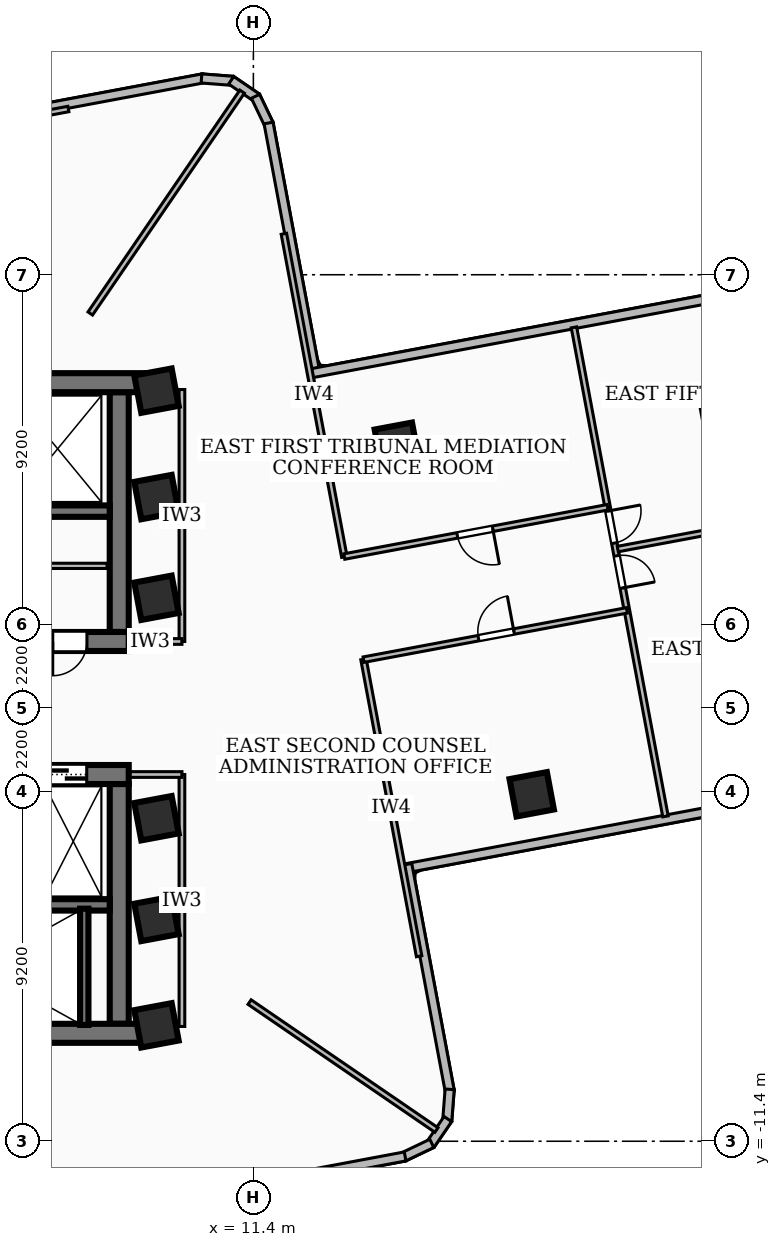
"""IFC4 building model, lengths in metres.
Left out: names, types, materials, properties, quantities, classifications, styles, units other than length and angle.
Written with IfcOpenShell. Run it as: python <this file> out.ifc"""

import sys

from ifc_helpers import new_model, si_unit, direction, frame, frame_2d, origin, origin_2d, place, context, subcontext, project, spatial, rectangle, extrude, element, fill, save


model = new_model("IFC4")
c1 = context("Model", 3, precision=1e-05, world=origin(), true_north=direction((0.0, 1.0)))
c2 = subcontext(c1, "Body", "Model", "MODEL_VIEW")
j1 = project(units=[si_unit("LENGTHUNIT", "METRE"), si_unit("PLANEANGLEUNIT", "RADIAN")], contexts=[c1])
p1 = place(None, origin())
s1 = spatial("IfcSite", under=j1, at=p1, CompositionType="ELEMENT")
p2 = place(p1, origin())
s2 = spatial("IfcBuilding", under=s1, at=p2, CompositionType="ELEMENT")
p3 = place(p2, frame((0.0, 0.0, 100.08)))
s3 = spatial("IfcBuildingStorey", under=s2, at=p3, CompositionType="ELEMENT", Elevation=100.08)
p4 = place(p3, frame((-8.78, 8.56, 0.0), z_axis=(0.0, 0.0, 1.0), x_axis=(1.0, 0.0, 0.0)))
e1 = element("IfcWall", 1, at=p4, inside=s3, PredefinedType="SHEAR", context=c2, shape_type="SweptSolid", body=[
    extrude(rectangle(XDim=17.56, YDim=0.5, at=frame_2d((8.78, 0.0))), origin(), (0.0, 0.0, 1.0), 3.34),
])
p5 = place(p3, frame((8.12, 1.75, 0.0), z_axis=(0.0, 0.0, 1.0), x_axis=(-1.0, 0.0, 0.0)))
e2 = element("IfcWall", 2, at=p5, inside=s3, PredefinedType="SHEAR", context=c2, shape_type="SweptSolid", body=[
    extrude(rectangle(XDim=16.24, YDim=0.5, at=frame_2d((8.12, 0.0))), origin(), (0.0, 0.0, 1.0), 3.34),
])
p6 = place(p5, frame((7.45, 0.0, 0.0)))
e3 = element("IfcOpeningElement", 3, at=p6, cuts=e2, PredefinedType="OPENING", context=c2, shape_type="SweptSolid", body=[
    extrude(rectangle(XDim=1.0, YDim=2.1, at=frame_2d((0.5, 1.05))), frame((0.0, 0.26, 0.0), z_axis=(0.0, -1.0, 0.0), x_axis=(1.0, 0.0, 0.0)), (0.0, 0.0, 1.0), 0.52),
])
p7 = place(p5, frame((3.4, 0.0, 0.0)))
e4 = element("IfcOpeningElement", 4, at=p7, cuts=e2, PredefinedType="OPENING", context=c2, shape_type="SweptSolid", body=[
    extrude(rectangle(XDim=0.9, YDim=2.06, at=frame_2d((0.45, 1.03))), frame((0.0, 0.26, 0.0), z_axis=(0.0, -1.0, 0.0), x_axis=(1.0, 0.0, 0.0)), (0.0, 0.0, 1.0), 0.52),
])
p8 = place(p5, frame((1.1, 0.0, 0.0)))
e5 = element("IfcOpeningElement", 5, at=p8, cuts=e2, PredefinedType="OPENING", context=c2, shape_type="SweptSolid", body=[
    extrude(rectangle(XDim=0.9, YDim=2.06, at=frame_2d((0.45, 1.03))), frame((0.0, 0.26, 0.0), z_axis=(0.0, -1.0, 0.0), x_axis=(1.0, 0.0, 0.0)), (0.0, 0.0, 1.0), 0.52),
])
p9 = place(p3, frame((7.87, 8.31, 0.0), z_axis=(0.0, 0.0, 1.0), x_axis=(0.0, -1.0, 0.0)))
e6 = element("IfcWall", 6, at=p9, inside=s3, PredefinedType="SHEAR", context=c2, shape_type="SweptSolid", body=[
    extrude(rectangle(XDim=6.31, YDim=0.5, at=frame_2d((3.155, 0.0))), origin(), (0.0, 0.0, 1.0), 3.34),
])
p10 = place(p3, frame((7.62, 5.18, 0.0), z_axis=(0.0, 0.0, 1.0), x_axis=(-1.0, 0.0, 0.0)))
e7 = element("IfcWall", 7, at=p10, inside=s3, PredefinedType="SOLIDWALL", context=c2, shape_type="SweptSolid", body=[
    extrude(rectangle(XDim=15.24, YDim=0.3, at=frame_2d((7.62, 0.0))), origin(), (0.0, 0.0, 1.0), 3.34),
])
p11 = place(p10, frame((5.77, 0.0, 0.0)))
e8 = element("IfcOpeningElement", 8, at=p11, cuts=e7, PredefinedType="OPENING", context=c2, shape_type="SweptSolid", body=[
    extrude(rectangle(XDim=1.1, YDim=2.15, at=frame_2d((0.55, 1.075))), frame((0.0, 0.16, 0.0), z_axis=(0.0, -1.0, 0.0), x_axis=(1.0, 0.0, 0.0)), (0.0, 0.0, 1.0), 0.32),
])
p12 = place(p10, frame((2.97, 0.0, 0.0)))
e9 = element("IfcOpeningElement", 9, at=p12, cuts=e7, PredefinedType="OPENING", context=c2, shape_type="SweptSolid", body=[
    extrude(rectangle(XDim=1.1, YDim=2.15, at=frame_2d((0.55, 1.075))), frame((0.0, 0.16, 0.0), z_axis=(0.0, -1.0, 0.0), x_axis=(1.0, 0.0, 0.0)), (0.0, 0.0, 1.0), 0.32),
])
p13 = place(p10, frame((7.97, 0.0, 0.0)))
e10 = element("IfcOpeningElement", 10, at=p13, cuts=e7, PredefinedType="OPENING", context=c2, shape_type="SweptSolid", body=[
    extrude(rectangle(XDim=1.0, YDim=2.1, at=frame_2d((0.5, 1.05))), frame((0.0, 0.16, 0.0), z_axis=(0.0, -1.0, 0.0), x_axis=(1.0, 0.0, 0.0)), (0.0, 0.0, 1.0), 0.32),
])
p14 = place(p3, frame((8.78, -8.56, 0.0), z_axis=(0.0, 0.0, 1.0), x_axis=(-1.0, 0.0, 0.0)))
e11 = element("IfcWall", 11, at=p14, inside=s3, PredefinedType="SHEAR", context=c2, shape_type="SweptSolid", body=[
    extrude(rectangle(XDim=17.56, YDim=0.5, at=frame_2d((8.78, 0.0))), origin(), (0.0, 0.0, 1.0), 3.34),
])
p15 = place(p3, frame((-8.12, -1.75, 0.0), z_axis=(0.0, 0.0, 1.0), x_axis=(1.0, 0.0, 0.0)))
e12 = element("IfcWall", 12, at=p15, inside=s3, PredefinedType="SHEAR", context=c2, shape_type="SweptSolid", body=[
    extrude(rectangle(XDim=16.24, YDim=0.5, at=frame_2d((8.12, 0.0))), origin(), (0.0, 0.0, 1.0), 3.34),
])
p16 = place(p15, frame((7.45, 0.0, 0.0)))
e13 = element("IfcOpeningElement", 13, at=p16, cuts=e12, PredefinedType="OPENING", context=c2, shape_type="SweptSolid", body=[
    extrude(rectangle(XDim=1.0, YDim=2.1, at=frame_2d((0.5, 1.05))), frame((0.0, 0.26, 0.0), z_axis=(0.0, -1.0, 0.0), x_axis=(1.0, 0.0, 0.0)), (0.0, 0.0, 1.0), 0.52),
])
p17 = place(p15, frame((10.965, 0.0, 0.0)))
e14 = element("IfcOpeningElement", 14, at=p17, cuts=e12, PredefinedType="OPENING", context=c2, shape_type="SweptSolid", body=[
    extrude(rectangle(XDim=1.05, YDim=2.15, at=frame_2d((0.525, 1.075))), frame((0.0, 0.26, 0.0), z_axis=(0.0, -1.0, 0.0), x_axis=(1.0, 0.0, 0.0)), (0.0, 0.0, 1.0), 0.52),
])
p18 = place(p15, frame((12.525, 0.0, 0.0)))
e15 = element("IfcOpeningElement", 15, at=p18, cuts=e12, PredefinedType="OPENING", context=c2, shape_type="SweptSolid", body=[
    extrude(rectangle(XDim=1.05, YDim=2.15, at=frame_2d((0.525, 1.075))), frame((0.0, 0.26, 0.0), z_axis=(0.0, -1.0, 0.0), x_axis=(1.0, 0.0, 0.0)), (0.0, 0.0, 1.0), 0.52),
])
p19 = place(p15, frame((14.085, 0.0, 0.0)))
e16 = element("IfcOpeningElement", 16, at=p19, cuts=e12, PredefinedType="OPENING", context=c2, shape_type="SweptSolid", body=[
    extrude(rectangle(XDim=1.05, YDim=2.15, at=frame_2d((0.525, 1.075))), frame((0.0, 0.26, 0.0), z_axis=(0.0, -1.0, 0.0), x_axis=(1.0, 0.0, 0.0)), (0.0, 0.0, 1.0), 0.52),
])
p20 = place(p3, frame((7.87, -2.0, 0.0), z_axis=(0.0, 0.0, 1.0), x_axis=(0.0, -1.0, 0.0)))
e17 = element("IfcWall", 17, at=p20, inside=s3, PredefinedType="SHEAR", context=c2, shape_type="SweptSolid", body=[
    extrude(rectangle(XDim=6.31, YDim=0.5, at=frame_2d((3.155, 0.0))), origin(), (0.0, 0.0, 1.0), 3.34),
])
p21 = place(p3, frame((-7.62, -5.18, 0.0), z_axis=(0.0, 0.0, 1.0), x_axis=(1.0, 0.0, 0.0)))
e18 = element("IfcWall", 18, at=p21, inside=s3, PredefinedType="SOLIDWALL", context=c2, shape_type="SweptSolid", body=[
    extrude(rectangle(XDim=15.24, YDim=0.3, at=frame_2d((7.62, 0.0))), origin(), (0.0, 0.0, 1.0), 3.34),
])
p22 = place(p21, frame((5.77, 0.0, 0.0)))
e19 = element("IfcOpeningElement", 19, at=p22, cuts=e18, PredefinedType="OPENING", context=c2, shape_type="SweptSolid", body=[
    extrude(rectangle(XDim=1.1, YDim=2.15, at=frame_2d((0.55, 1.075))), frame((0.0, 0.16, 0.0), z_axis=(0.0, -1.0, 0.0), x_axis=(1.0, 0.0, 0.0)), (0.0, 0.0, 1.0), 0.32),
])
p23 = place(p21, frame((7.97, 0.0, 0.0)))
e20 = element("IfcOpeningElement", 20, at=p23, cuts=e18, PredefinedType="OPENING", context=c2, shape_type="SweptSolid", body=[
    extrude(rectangle(XDim=1.0, YDim=2.1, at=frame_2d((0.5, 1.05))), frame((0.0, 0.16, 0.0), z_axis=(0.0, -1.0, 0.0), x_axis=(1.0, 0.0, 0.0)), (0.0, 0.0, 1.0), 0.32),
])
p24 = place(p3, frame((6.95, -8.34, 0.0), z_axis=(0.0, 0.0, 1.0), x_axis=(0.0, 1.0, 0.0)))
e21 = element("IfcWall", 21, at=p24, inside=s3, PredefinedType="SOLIDWALL", context=c2, shape_type="SweptSolid", body=[
    extrude(rectangle(XDim=3.06, YDim=0.22, at=frame_2d((1.53, 0.0))), origin(), (0.0, 0.0, 1.0), 3.34),
])
for number, where, z_axis, x_axis in (
    (22, (8.85, -5.55, 0.0), (0.0, 0.0, 1.0), (0.983, 0.184, 0.0)),
    (23, (8.85, -2.9, 0.0), (0.0, 0.0, 1.0), (0.983, 0.184, 0.0)),
    (24, (8.85, 2.9, 0.0), (0.0, 0.0, 1.0), (0.983, 0.184, 0.0)),
    (25, (8.85, 5.55, 0.0), (0.0, 0.0, 1.0), (0.983, 0.184, 0.0)),
    (26, (8.85, -8.35, 0.0), (0.0, 0.0, 1.0), (0.983, 0.184, 0.0)),
    (27, (8.85, 8.35, 0.0), (0.0, 0.0, 1.0), (0.983, 0.184, 0.0)),
    (28, (18.724, -2.271, 0.0), (0.0, 0.0, 1.0), (0.983, 0.184, 0.0)),
    (29, (15.175, 6.927, 0.0), (0.0, 0.0, 1.0), (0.983, 0.184, 0.0)),
    (30, (23.715, 7.851, 0.0), (0.0, 0.0, 1.0), (0.983, 0.184, 0.0)),
):
    element("IfcColumn", number, at=place(p3, frame(where, z_axis=z_axis, x_axis=x_axis)), inside=s3, PredefinedType="COLUMN", context=c2, shape_type="SweptSolid", body=[
        extrude(rectangle(XDim=1.0, YDim=1.0, at=origin_2d()), origin(), (0.0, 0.0, 1.0), 3.6),
    ])
p25 = place(p3, frame((4.113, 15.45, 0.0), z_axis=(0.0, 0.0, 1.0), x_axis=(0.982913564854, 0.18406771587, 0.0)))
e31 = element("IfcWall", 31, at=p25, inside=s3, PredefinedType="SOLIDWALL", context=c2, shape_type="SweptSolid", body=[
    extrude(rectangle(XDim=6.075, YDim=0.24, at=frame_2d((3.037, 0.0))), origin(), (0.0, 0.0, 1.0), 2.486),
])
p26 = place(p3, frame((10.034, 16.565, 0.0), z_axis=(0.0, 0.0, 1.0), x_axis=(0.997030229365, -0.077011179273, 0.0)))
e32 = element("IfcWall", 32, at=p26, inside=s3, PredefinedType="SOLIDWALL", context=c2, shape_type="SweptSolid", body=[
    extrude(rectangle(XDim=0.831, YDim=0.24, at=frame_2d((0.415, 0.0))), origin(), (0.0, 0.0, 1.0), 3.34),
])
p27 = place(p3, frame((10.816, 16.517, 0.0), z_axis=(0.0, 0.0, 1.0), x_axis=(0.825814611055, -0.563941688624, 0.0)))
e33 = element("IfcWall", 33, at=p27, inside=s3, PredefinedType="SOLIDWALL", context=c2, shape_type="SweptSolid", body=[
    extrude(rectangle(XDim=0.814, YDim=0.24, at=frame_2d((0.407, 0.0))), origin(), (0.0, 0.0, 1.0), 3.34),
])
p28 = place(p3, frame((11.456, 16.095, 0.0), z_axis=(0.0, 0.0, 1.0), x_axis=(0.431642510533, -0.902044756706, 0.0)))
e34 = element("IfcWall", 34, at=p28, inside=s3, PredefinedType="SOLIDWALL", context=c2, shape_type="SweptSolid", body=[
    extrude(rectangle(XDim=0.832, YDim=0.24, at=frame_2d((0.416, 0.0))), origin(), (0.0, 0.0, 1.0), 3.34),
])
p29 = place(p3, frame((11.799, 15.393, 0.0), z_axis=(0.0, 0.0, 1.0), x_axis=(0.184184115697, -0.982891759821, 0.0)))
e35 = element("IfcWall", 35, at=p29, inside=s3, PredefinedType="SOLIDWALL", context=c2, shape_type="SweptSolid", body=[
    extrude(rectangle(XDim=6.776, YDim=0.24, at=frame_2d((3.388, 0.0))), origin(), (0.0, 0.0, 1.0), 3.34),
])
p30 = place(p3, frame((12.935, 8.809, 0.0), z_axis=(0.0, 0.0, 1.0), x_axis=(0.982922588066, 0.184019525782, 0.0)))
e36 = element("IfcWall", 36, at=p30, inside=s3, PredefinedType="SOLIDWALL", context=c2, shape_type="SweptSolid", body=[
    extrude(rectangle(XDim=16.275, YDim=0.24, at=frame_2d((8.137, 0.0))), origin(), (0.0, 0.0, 1.0), 3.34),
])
p31 = place(p30, frame((13.375, 0.0, 0.85)))
e37 = element("IfcOpeningElement", 37, at=p31, cuts=e36, PredefinedType="OPENING", context=c2, shape_type="SweptSolid", body=[
    extrude(rectangle(XDim=1.8, YDim=1.8, at=frame_2d((0.9, 0.9))), frame((0.0, 0.13, 0.0), z_axis=(0.0, -1.0, 0.0), x_axis=(1.0, 0.0, 0.0)), (0.0, 0.0, 1.0), 0.26),
])
p32 = place(p3, frame((31.371, -1.23, 0.0), z_axis=(0.0, 0.0, 1.0), x_axis=(-0.982920382654, -0.18403130539, 0.0)))
e38 = element("IfcWall", 38, at=p32, inside=s3, PredefinedType="SOLIDWALL", context=c2, shape_type="SweptSolid", body=[
    extrude(rectangle(XDim=16.275, YDim=0.24, at=frame_2d((8.138, 0.0))), origin(), (0.0, 0.0, 1.0), 3.34),
])
p33 = place(p32, frame((1.1, 0.0, 0.85)))
e39 = element("IfcOpeningElement", 39, at=p33, cuts=e38, PredefinedType="OPENING", context=c2, shape_type="SweptSolid", body=[
    extrude(rectangle(XDim=2.4, YDim=2.1, at=frame_2d((1.2, 1.05))), frame((0.0, 0.13, 0.0), z_axis=(0.0, -1.0, 0.0), x_axis=(1.0, 0.0, 0.0)), (0.0, 0.0, 1.0), 0.26),
])
p34 = place(p3, frame((15.45, -4.113, 0.0), z_axis=(0.0, 0.0, 1.0), x_axis=(0.18406771587, -0.982913564854, 0.0)))
e40 = element("IfcWall", 40, at=p34, inside=s3, PredefinedType="SOLIDWALL", context=c2, shape_type="SweptSolid", body=[
    extrude(rectangle(XDim=6.075, YDim=0.24, at=frame_2d((3.037, 0.0))), origin(), (0.0, 0.0, 1.0), 3.34),
])
p35 = place(p3, frame((16.565, -10.034, 0.0), z_axis=(0.0, 0.0, 1.0), x_axis=(-0.077011179273, -0.997030229365, 0.0)))
e41 = element("IfcWall", 41, at=p35, inside=s3, PredefinedType="SOLIDWALL", context=c2, shape_type="SweptSolid", body=[
    extrude(rectangle(XDim=0.831, YDim=0.24, at=frame_2d((0.415, 0.0))), origin(), (0.0, 0.0, 1.0), 3.34),
])
p36 = place(p3, frame((16.517, -10.816, 0.0), z_axis=(0.0, 0.0, 1.0), x_axis=(-0.563941688624, -0.825814611055, 0.0)))
e42 = element("IfcWall", 42, at=p36, inside=s3, PredefinedType="SOLIDWALL", context=c2, shape_type="SweptSolid", body=[
    extrude(rectangle(XDim=0.814, YDim=0.24, at=frame_2d((0.407, 0.0))), origin(), (0.0, 0.0, 1.0), 3.34),
])
p37 = place(p3, frame((16.095, -11.456, 0.0), z_axis=(0.0, 0.0, 1.0), x_axis=(-0.902044756706, -0.431642510533, 0.0)))
e43 = element("IfcWall", 43, at=p37, inside=s3, PredefinedType="SOLIDWALL", context=c2, shape_type="SweptSolid", body=[
    extrude(rectangle(XDim=0.832, YDim=0.24, at=frame_2d((0.416, 0.0))), origin(), (0.0, 0.0, 1.0), 3.34),
])
p38 = place(p3, frame((15.393, -11.799, 0.0), z_axis=(0.0, 0.0, 1.0), x_axis=(-0.982891759821, -0.184184115697, 0.0)))
e44 = element("IfcWall", 44, at=p38, inside=s3, PredefinedType="SOLIDWALL", context=c2, shape_type="SweptSolid", body=[
    extrude(rectangle(XDim=6.776, YDim=0.24, at=frame_2d((3.388, 0.0))), origin(), (0.0, 0.0, 1.0), 3.34),
])
p39 = place(p3, frame((2.9, 3.74, 0.0), z_axis=(0.0, 0.0, 1.0), x_axis=(1.0, 0.0, 0.0)))
e45 = element("IfcWall", 45, at=p39, inside=s3, PredefinedType="PARTITIONING", context=c2, shape_type="SweptSolid", body=[
    extrude(rectangle(XDim=4.65, YDim=0.138, at=frame_2d((2.325, 0.0))), origin(), (0.0, 0.0, 1.0), 3.34),
])
p40 = place(p3, frame((9.52, 1.75, 0.0), z_axis=(0.0, 0.0, 1.0), x_axis=(0.0, 1.0, 0.0)))
e46 = element("IfcWall", 46, at=p40, inside=s3, PredefinedType="PARTITIONING", context=c2, shape_type="SweptSolid", body=[
    extrude(rectangle(XDim=6.63, YDim=0.15, at=frame_2d((3.315, 0.0))), origin(), (0.0, 0.0, 1.0), 2.486),
])
p41 = place(p3, frame((7.85, 1.75, 0.0), z_axis=(0.0, 0.0, 1.0), x_axis=(1.0, 0.0, 0.0)))
e47 = element("IfcWall", 47, at=p41, inside=s3, PredefinedType="PARTITIONING", context=c2, shape_type="SweptSolid", body=[
    extrude(rectangle(XDim=1.67, YDim=0.15, at=frame_2d((0.835, 0.0))), origin(), (0.0, 0.0, 1.0), 2.405),
])
p42 = place(p3, frame((9.52, -8.38, 0.0), z_axis=(0.0, 0.0, 1.0), x_axis=(0.0, 1.0, 0.0)))
e48 = element("IfcWall", 48, at=p42, inside=s3, PredefinedType="PARTITIONING", context=c2, shape_type="SweptSolid", body=[
    extrude(rectangle(XDim=6.63, YDim=0.15, at=frame_2d((3.315, 0.0))), origin(), (0.0, 0.0, 1.0), 2.486),
])
p43 = place(p3, frame((7.85, -1.75, 0.0), z_axis=(0.0, 0.0, 1.0), x_axis=(1.0, 0.0, 0.0)))
e49 = element("IfcWall", 49, at=p43, inside=s3, PredefinedType="PARTITIONING", context=c2, shape_type="SweptSolid", body=[
    extrude(rectangle(XDim=1.67, YDim=0.15, at=frame_2d((0.835, 0.0))), origin(), (0.0, 0.0, 1.0), 2.405),
])
p44 = place(p3, frame((7.108, 10.38, 0.0), z_axis=(0.0, 0.0, 1.0), x_axis=(0.564900413187, 0.825159089619, 0.0)))
e50 = element("IfcWall", 50, at=p44, inside=s3, PredefinedType="PARTITIONING", context=c2, shape_type="SweptSolid", body=[
    extrude(rectangle(XDim=7.074, YDim=0.145, at=frame_2d((3.537, 0.0))), origin(), (0.0, 0.0, 1.0), 2.486),
])
p45 = place(p3, frame((11.3, -7.738, 0.0), z_axis=(0.0, 0.0, 1.0), x_axis=(0.825173577049, -0.564879250584, 0.0)))
e51 = element("IfcWall", 51, at=p45, inside=s3, PredefinedType="PARTITIONING", context=c2, shape_type="SweptSolid", body=[
    extrude(rectangle(XDim=5.959, YDim=0.145, at=frame_2d((2.979, 0.0))), origin(), (0.0, 0.0, 1.0), 3.34),
])
p46 = place(p3, frame((13.794, 3.975, 0.0), z_axis=(0.0, 0.0, 1.0), x_axis=(-0.183947683851, 0.982936035358, 0.0)))
e52 = element("IfcWall", 52, at=p46, inside=s3, PredefinedType="PARTITIONING", context=c2, shape_type="SweptSolid", body=[
    extrude(rectangle(XDim=8.65, YDim=0.145, at=frame_2d((4.325, 0.0))), origin(), (0.0, 0.0, 1.0), 2.486),
])
p47 = place(p3, frame((15.761, -6.532, 0.0), z_axis=(0.0, 0.0, 1.0), x_axis=(-0.184017811376, 0.98292290903, 0.0)))
e53 = element("IfcWall", 53, at=p47, inside=s3, PredefinedType="PARTITIONING", context=c2, shape_type="SweptSolid", body=[
    extrude(rectangle(XDim=7.95, YDim=0.145, at=frame_2d((3.975, 0.0))), origin(), (0.0, 0.0, 1.0), 2.486),
])
p48 = place(p3, frame((20.722, 5.282, 0.0), z_axis=(0.0, 0.0, 1.0), x_axis=(-0.982936027627, -0.183947725163, 0.0)))
e54 = element("IfcWall", 54, at=p48, inside=s3, PredefinedType="PARTITIONING", context=c2, shape_type="SweptSolid", body=[
    extrude(rectangle(XDim=7.05, YDim=0.145, at=frame_2d((3.525, 0.0))), origin(), (0.0, 0.0, 1.0), 3.34),
])
p49 = place(p48, frame((3.075, 0.0, 0.0)))
e55 = element("IfcOpeningElement", 55, at=p49, cuts=e54, PredefinedType="OPENING", context=c2, shape_type="SweptSolid", body=[
    extrude(rectangle(XDim=0.95, YDim=2.08, at=frame_2d((0.475, 1.04))), frame((0.0, 0.083, 0.0), z_axis=(0.0, -1.0, 0.0), x_axis=(1.0, 0.0, 0.0)), (0.0, 0.0, 1.0), 0.165),
])
p50 = place(p3, frame((14.3, 1.272, 0.0), z_axis=(0.0, 0.0, 1.0), x_axis=(0.98292976592, 0.183981181833, 0.0)))
e56 = element("IfcWall", 56, at=p50, inside=s3, PredefinedType="PARTITIONING", context=c2, shape_type="SweptSolid", body=[
    extrude(rectangle(XDim=7.05, YDim=0.145, at=frame_2d((3.525, 0.0))), origin(), (0.0, 0.0, 1.0), 3.34),
])
p51 = place(p50, frame((3.075, 0.0, 0.0)))
e57 = element("IfcOpeningElement", 57, at=p51, cuts=e56, PredefinedType="OPENING", context=c2, shape_type="SweptSolid", body=[
    extrude(rectangle(XDim=0.95, YDim=2.08, at=frame_2d((0.475, 1.04))), frame((0.0, 0.083, 0.0), z_axis=(0.0, -1.0, 0.0), x_axis=(1.0, 0.0, 0.0)), (0.0, 0.0, 1.0), 0.165),
])
p52 = place(p3, frame((20.989, 4.182, 0.0), z_axis=(0.0, 0.0, 1.0), x_axis=(0.982930571593, 0.183976877429, 0.0)))
e58 = element("IfcWall", 58, at=p52, inside=s3, PredefinedType="PARTITIONING", context=c2, shape_type="SweptSolid", body=[
    extrude(rectangle(XDim=10.595, YDim=0.145, at=frame_2d((5.297, 0.0))), origin(), (0.0, 0.0, 1.0), 2.832),
])
p53 = place(p3, frame((19.836, 10.015, 0.0), z_axis=(0.0, 0.0, 1.0), x_axis=(0.183949578206, -0.982935680845, 0.0)))
e59 = element("IfcWall", 59, at=p53, inside=s3, PredefinedType="PARTITIONING", context=c2, shape_type="SweptSolid", body=[
    extrude(rectangle(XDim=13.09, YDim=0.145, at=frame_2d((6.545, 0.0))), origin(), (0.0, 0.0, 1.0), 2.486),
])
p54 = place(p53, frame((6.115, 0.0, 0.0)))
e60 = element("IfcOpeningElement", 60, at=p54, cuts=e59, PredefinedType="OPENING", context=c2, shape_type="SweptSolid", body=[
    extrude(rectangle(XDim=0.86, YDim=2.04, at=frame_2d((0.43, 1.02))), frame((0.0, 0.083, 0.0), z_axis=(0.0, -1.0, 0.0), x_axis=(1.0, 0.0, 0.0)), (0.0, 0.0, 1.0), 0.165),
])
p55 = place(p53, frame((4.915, 0.0, 0.0)))
e61 = element("IfcOpeningElement", 61, at=p55, cuts=e59, PredefinedType="OPENING", context=c2, shape_type="SweptSolid", body=[
    extrude(rectangle(XDim=0.86, YDim=2.04, at=frame_2d((0.43, 1.02))), frame((0.0, 0.083, 0.0), z_axis=(0.0, -1.0, 0.0), x_axis=(1.0, 0.0, 0.0)), (0.0, 0.0, 1.0), 0.165),
])
p56 = place(p3, frame((6.532, 15.761, 0.0), z_axis=(0.0, 0.0, 1.0), x_axis=(-0.98292290903, -0.184017811376, 0.0)))
e62 = element("IfcWall", 62, at=p56, inside=s3, PredefinedType="PARTITIONING", context=c2, shape_type="SweptSolid", body=[
    extrude(rectangle(XDim=7.95, YDim=0.145, at=frame_2d((3.975, 0.0))), origin(), (0.0, 0.0, 1.0), 2.486),
])
p57 = place(p19, origin())
e63 = element("IfcDoor", 63, at=p57, inside=s3, OperationType="DOUBLE_DOOR_SLIDING", PredefinedType="DOOR", context=c2, shape_type="SweptSolid", body=[
    extrude(rectangle(XDim=1.05, YDim=2.15, at=frame_2d((0.525, 1.075))), frame((0.0, 0.025, 0.0), z_axis=(0.0, -1.0, 0.0), x_axis=(1.0, 0.0, 0.0)), (0.0, 0.0, 1.0), 0.05),
])
fill(e16, e63)
p58 = place(p8, origin())
e64 = element("IfcDoor", 64, at=p58, inside=s3, OperationType="SINGLE_SWING_RIGHT", PredefinedType="DOOR", context=c2, shape_type="SweptSolid", body=[
    extrude(rectangle(XDim=0.9, YDim=2.06, at=frame_2d((0.45, 1.03))), frame((0.0, 0.025, 0.0), z_axis=(0.0, -1.0, 0.0), x_axis=(1.0, 0.0, 0.0)), (0.0, 0.0, 1.0), 0.05),
])
fill(e5, e64)
p59 = place(p49, origin())
e65 = element("IfcDoor", 65, at=p59, inside=s3, OperationType="SINGLE_SWING_LEFT", PredefinedType="DOOR", context=c2, shape_type="SweptSolid", body=[
    extrude(rectangle(XDim=0.95, YDim=2.08, at=frame_2d((0.475, 1.04))), frame((0.0, 0.025, 0.0), z_axis=(0.0, -1.0, 0.0), x_axis=(1.0, 0.0, 0.0)), (0.0, 0.0, 1.0), 0.05),
])
fill(e55, e65)
p60 = place(p51, origin())
e66 = element("IfcDoor", 66, at=p60, inside=s3, OperationType="SINGLE_SWING_RIGHT", PredefinedType="DOOR", context=c2, shape_type="SweptSolid", body=[
    extrude(rectangle(XDim=0.95, YDim=2.08, at=frame_2d((0.475, 1.04))), frame((0.0, 0.025, 0.0), z_axis=(0.0, -1.0, 0.0), x_axis=(1.0, 0.0, 0.0)), (0.0, 0.0, 1.0), 0.05),
])
fill(e57, e66)
p61 = place(p54, origin())
e67 = element("IfcDoor", 67, at=p61, inside=s3, OperationType="SINGLE_SWING_RIGHT", PredefinedType="DOOR", context=c2, shape_type="SweptSolid", body=[
    extrude(rectangle(XDim=0.86, YDim=2.04, at=frame_2d((0.43, 1.02))), frame((0.0, 0.025, 0.0), z_axis=(0.0, -1.0, 0.0), x_axis=(1.0, 0.0, 0.0)), (0.0, 0.0, 1.0), 0.05),
])
fill(e60, e67)
p62 = place(p55, origin())
e68 = element("IfcDoor", 68, at=p62, inside=s3, OperationType="SINGLE_SWING_LEFT", PredefinedType="DOOR", context=c2, shape_type="SweptSolid", body=[
    extrude(rectangle(XDim=0.86, YDim=2.04, at=frame_2d((0.43, 1.02))), frame((0.0, 0.025, 0.0), z_axis=(0.0, -1.0, 0.0), x_axis=(1.0, 0.0, 0.0)), (0.0, 0.0, 1.0), 0.05),
])
fill(e61, e68)
save(model, sys.argv[1])
